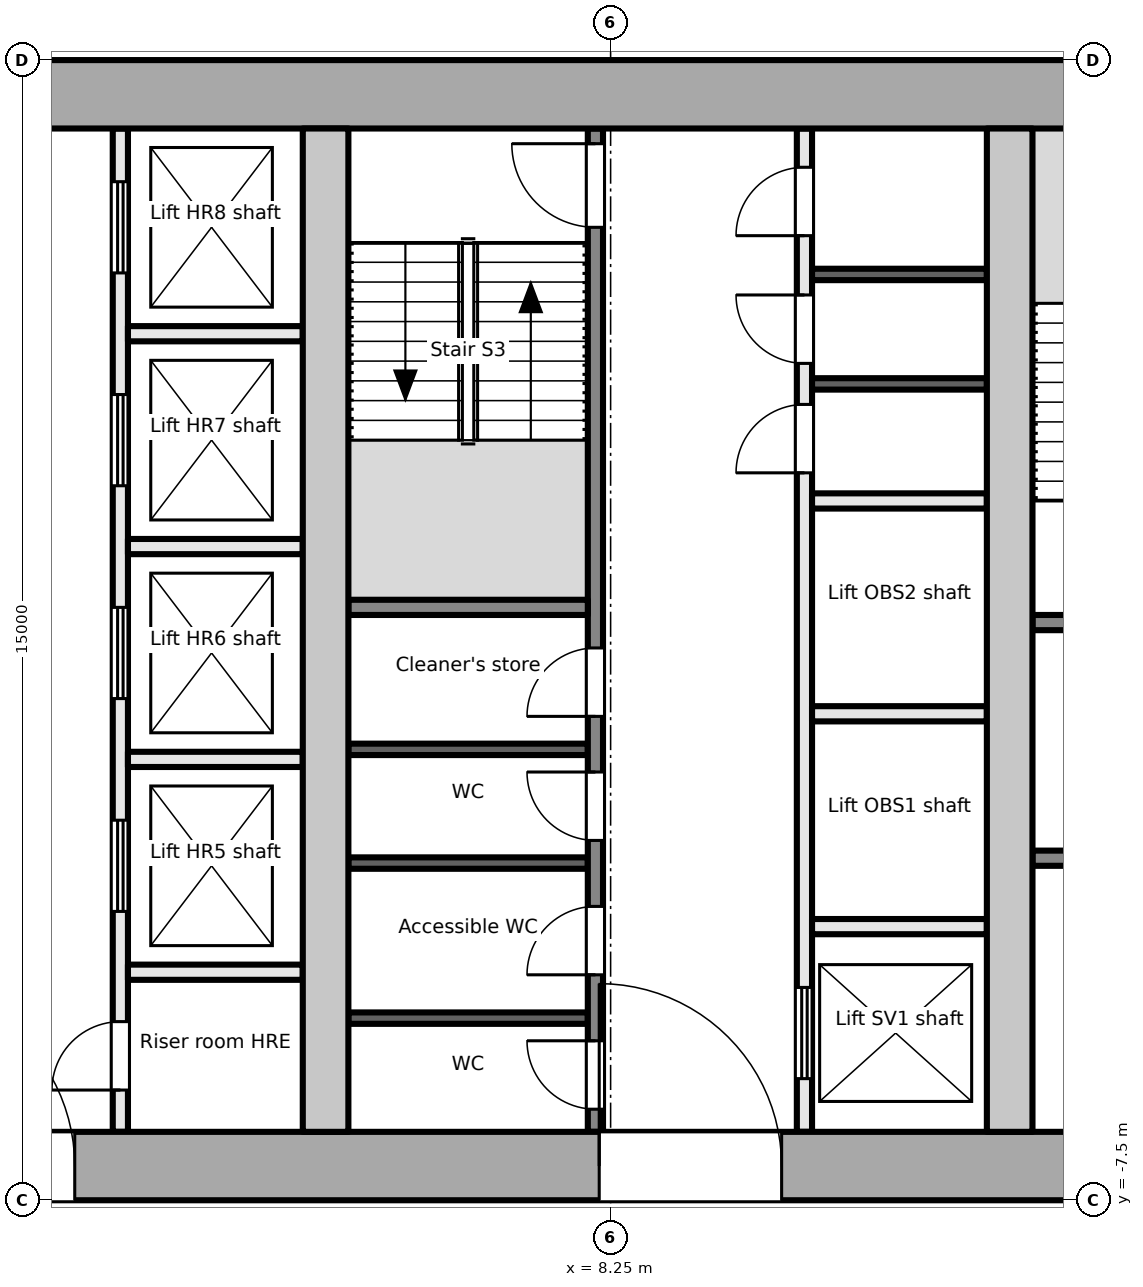
"""IFC4 building model, lengths in metres.
Left out: names, types, materials, properties, quantities, classifications, styles, units other than length and angle.
Written with IfcOpenShell. Run it as: python <this file> out.ifc"""

import sys

from ifc_helpers import new_model, si_unit, direction, frame, frame_2d, origin, place, context, subcontext, project, spatial, rectangle, extrude, element, fill, save


model = new_model("IFC4")
c1 = context("Model", 3, precision=1e-05, world=origin(), true_north=direction((0.0, 1.0)))
c2 = subcontext(c1, "Body", "Model", "MODEL_VIEW")
j1 = project(units=[si_unit("LENGTHUNIT", "METRE"), si_unit("PLANEANGLEUNIT", "RADIAN")], contexts=[c1])
p1 = place(None, origin())
s1 = spatial("IfcSite", under=j1, at=p1, CompositionType="ELEMENT")
p2 = place(p1, origin())
s2 = spatial("IfcBuilding", under=s1, at=p2, CompositionType="ELEMENT")
p3 = place(p2, frame((0.0, 0.0, 236.9)))
s3 = spatial("IfcBuildingStorey", under=s2, at=p3, CompositionType="ELEMENT", Elevation=236.9)
p4 = place(p3, frame((-18.0, -7.05, -0.2), z_axis=(0.0, 0.0, 1.0), x_axis=(1.0, 0.0, 0.0)))
e1 = element("IfcWall", 1, at=p4, inside=s3, PredefinedType="SHEAR", context=c2, shape_type="SweptSolid", body=[
    extrude(rectangle(XDim=36.0, YDim=0.9, at=frame_2d((18.0, 0.0))), origin(), (0.0, 0.0, 1.0), 3.9),
])
p5 = place(p4, frame((11.3, 0.0, 0.2)))
e2 = element("IfcOpeningElement", 2, at=p5, cuts=e1, PredefinedType="OPENING", context=c2, shape_type="SweptSolid", body=[
    extrude(rectangle(XDim=1.8, YDim=2.1, at=frame_2d((0.9, 1.05))), frame((0.0, 0.46, 0.0), z_axis=(0.0, -1.0, 0.0), x_axis=(1.0, 0.0, 0.0)), (0.0, 0.0, 1.0), 0.921),
])
p6 = place(p4, frame((16.8, 0.0, 0.2)))
e3 = element("IfcOpeningElement", 3, at=p6, cuts=e1, PredefinedType="OPENING", context=c2, shape_type="SweptSolid", body=[
    extrude(rectangle(XDim=2.4, YDim=2.1, at=frame_2d((1.2, 1.05))), frame((0.0, 0.46, 0.0), z_axis=(0.0, -1.0, 0.0), x_axis=(1.0, 0.0, 0.0)), (0.0, 0.0, 1.0), 0.921),
])
p7 = place(p4, frame((26.1, 0.0, 0.2)))
e4 = element("IfcOpeningElement", 4, at=p7, cuts=e1, PredefinedType="OPENING", context=c2, shape_type="SweptSolid", body=[
    extrude(rectangle(XDim=2.4, YDim=2.1, at=frame_2d((1.2, 1.05))), frame((0.0, 0.46, 0.0), z_axis=(0.0, -1.0, 0.0), x_axis=(1.0, 0.0, 0.0)), (0.0, 0.0, 1.0), 0.921),
])
p8 = place(p3, frame((-18.0, 7.05, -0.2), z_axis=(0.0, 0.0, 1.0), x_axis=(1.0, 0.0, 0.0)))
e5 = element("IfcWall", 5, at=p8, inside=s3, PredefinedType="SHEAR", context=c2, shape_type="SweptSolid", body=[
    extrude(rectangle(XDim=36.0, YDim=0.9, at=frame_2d((18.0, 0.0))), origin(), (0.0, 0.0, 1.0), 3.9),
])
for number, where, z_axis, x_axis in (
    (6, (4.5, -6.6, -0.2), (0.0, 0.0, 1.0), (0.0, 1.0, 0.0)),
    (7, (13.5, -6.6, -0.2), (0.0, 0.0, 1.0), (0.0, 1.0, 0.0)),
):
    element("IfcWall", number, at=place(p3, frame(where, z_axis=z_axis, x_axis=x_axis)), inside=s3, PredefinedType="SHEAR", context=c2, shape_type="SweptSolid", body=[
        extrude(rectangle(XDim=13.2, YDim=0.6, at=frame_2d((6.6, 0.0))), origin(), (0.0, 0.0, 1.0), 3.9),
    ])
p9 = place(p3, frame((13.8, -3.0, 0.0), z_axis=(0.0, 0.0, 1.0), x_axis=(1.0, 0.0, 0.0)))
e8 = element("IfcWall", 8, at=p9, inside=s3, PredefinedType="PARTITIONING", context=c2, shape_type="SweptSolid", body=[
    extrude(rectangle(XDim=3.3, YDim=0.2, at=frame_2d((1.65, 0.0))), origin(), (0.0, 0.0, 1.0), 3.7),
])
p10 = place(p9, frame((1.1, 0.0, 0.0)))
e9 = element("IfcOpeningElement", 9, at=p10, cuts=e8, PredefinedType="OPENING", context=c2, shape_type="SweptSolid", body=[
    extrude(rectangle(XDim=1.1, YDim=2.1, at=frame_2d((0.55, 1.05))), frame((0.0, 0.111, 0.0), z_axis=(0.0, -1.0, 0.0), x_axis=(1.0, 0.0, 0.0)), (0.0, 0.0, 1.0), 0.221),
])
p11 = place(p3, frame((13.8, 0.1, 0.0), z_axis=(0.0, 0.0, 1.0), x_axis=(1.0, 0.0, 0.0)))
e10 = element("IfcWall", 10, at=p11, inside=s3, PredefinedType="PARTITIONING", context=c2, shape_type="SweptSolid", body=[
    extrude(rectangle(XDim=3.3, YDim=0.2, at=frame_2d((1.65, 0.0))), origin(), (0.0, 0.0, 1.0), 3.7),
])
p12 = place(p11, frame((1.1, 0.0, 0.0)))
e11 = element("IfcOpeningElement", 11, at=p12, cuts=e10, PredefinedType="OPENING", context=c2, shape_type="SweptSolid", body=[
    extrude(rectangle(XDim=1.1, YDim=2.1, at=frame_2d((0.55, 1.05))), frame((0.0, 0.111, 0.0), z_axis=(0.0, -1.0, 0.0), x_axis=(1.0, 0.0, 0.0)), (0.0, 0.0, 1.0), 0.221),
])
p13 = place(p3, frame((1.8, -6.6, 0.0), z_axis=(0.0, 0.0, 1.0), x_axis=(0.0, 1.0, 0.0)))
e12 = element("IfcWall", 12, at=p13, inside=s3, PredefinedType="PARTITIONING", context=c2, shape_type="SweptSolid", body=[
    extrude(rectangle(XDim=13.2, YDim=0.2, at=frame_2d((6.6, 0.0))), origin(), (0.0, 0.0, 1.0), 3.7),
])
p14 = place(p13, frame((0.55, 0.0, 0.0)))
e13 = element("IfcOpeningElement", 13, at=p14, cuts=e12, PredefinedType="OPENING", context=c2, shape_type="SweptSolid", body=[
    extrude(rectangle(XDim=0.9, YDim=2.1, at=frame_2d((0.45, 1.05))), frame((0.0, 0.111, 0.0), z_axis=(0.0, -1.0, 0.0), x_axis=(1.0, 0.0, 0.0)), (0.0, 0.0, 1.0), 0.221),
])
p15 = place(p13, frame((2.9, 0.0, 0.0)))
e14 = element("IfcOpeningElement", 14, at=p15, cuts=e12, PredefinedType="OPENING", context=c2, shape_type="SweptSolid", body=[
    extrude(rectangle(XDim=1.2, YDim=2.1, at=frame_2d((0.6, 1.05))), frame((0.0, 0.111, 0.0), z_axis=(0.0, -1.0, 0.0), x_axis=(1.0, 0.0, 0.0)), (0.0, 0.0, 1.0), 0.221),
])
p16 = place(p13, frame((5.7, 0.0, 0.0)))
e15 = element("IfcOpeningElement", 15, at=p16, cuts=e12, PredefinedType="OPENING", context=c2, shape_type="SweptSolid", body=[
    extrude(rectangle(XDim=1.2, YDim=2.1, at=frame_2d((0.6, 1.05))), frame((0.0, 0.111, 0.0), z_axis=(0.0, -1.0, 0.0), x_axis=(1.0, 0.0, 0.0)), (0.0, 0.0, 1.0), 0.221),
])
p17 = place(p13, frame((8.5, 0.0, 0.0)))
e16 = element("IfcOpeningElement", 16, at=p17, cuts=e12, PredefinedType="OPENING", context=c2, shape_type="SweptSolid", body=[
    extrude(rectangle(XDim=1.2, YDim=2.1, at=frame_2d((0.6, 1.05))), frame((0.0, 0.111, 0.0), z_axis=(0.0, -1.0, 0.0), x_axis=(1.0, 0.0, 0.0)), (0.0, 0.0, 1.0), 0.221),
])
p18 = place(p13, frame((11.3, 0.0, 0.0)))
e17 = element("IfcOpeningElement", 17, at=p18, cuts=e12, PredefinedType="OPENING", context=c2, shape_type="SweptSolid", body=[
    extrude(rectangle(XDim=1.2, YDim=2.1, at=frame_2d((0.6, 1.05))), frame((0.0, 0.111, 0.0), z_axis=(0.0, -1.0, 0.0), x_axis=(1.0, 0.0, 0.0)), (0.0, 0.0, 1.0), 0.221),
])
for number, where, z_axis, x_axis in (
    (18, (1.9, -1.7, 0.0), (0.0, 0.0, 1.0), (1.0, 0.0, 0.0)),
    (19, (1.9, 1.1, 0.0), (0.0, 0.0, 1.0), (1.0, 0.0, 0.0)),
    (20, (1.9, 3.9, 0.0), (0.0, 0.0, 1.0), (1.0, 0.0, 0.0)),
    (21, (1.9, -4.5, 0.0), (0.0, 0.0, 1.0), (1.0, 0.0, 0.0)),
):
    element("IfcWall", number, at=place(p3, frame(where, z_axis=z_axis, x_axis=x_axis)), inside=s3, PredefinedType="PARTITIONING", context=c2, shape_type="SweptSolid", body=[
        extrude(rectangle(XDim=2.3, YDim=0.2, at=frame_2d((1.15, 0.0))), origin(), (0.0, 0.0, 1.0), 3.7),
    ])
p19 = place(p3, frame((8.05, -6.6, 0.0), z_axis=(0.0, 0.0, 1.0), x_axis=(0.0, 1.0, 0.0)))
e22 = element("IfcWall", 22, at=p19, inside=s3, PredefinedType="PARTITIONING", context=c2, shape_type="SweptSolid", body=[
    extrude(rectangle(XDim=13.2, YDim=0.2, at=frame_2d((6.6, 0.0))), origin(), (0.0, 0.0, 1.0), 3.7),
])
p20 = place(p19, frame((0.298, 0.0, 0.0)))
e23 = element("IfcOpeningElement", 23, at=p20, cuts=e22, PredefinedType="OPENING", context=c2, shape_type="SweptSolid", body=[
    extrude(rectangle(XDim=0.9, YDim=2.1, at=frame_2d((0.45, 1.05))), frame((0.0, 0.111, 0.0), z_axis=(0.0, -1.0, 0.0), x_axis=(1.0, 0.0, 0.0)), (0.0, 0.0, 1.0), 0.221),
])
p21 = place(p19, frame((2.066, 0.0, 0.0)))
e24 = element("IfcOpeningElement", 24, at=p21, cuts=e22, PredefinedType="OPENING", context=c2, shape_type="SweptSolid", body=[
    extrude(rectangle(XDim=0.9, YDim=2.1, at=frame_2d((0.45, 1.05))), frame((0.0, 0.111, 0.0), z_axis=(0.0, -1.0, 0.0), x_axis=(1.0, 0.0, 0.0)), (0.0, 0.0, 1.0), 0.221),
])
p22 = place(p19, frame((3.834, 0.0, 0.0)))
e25 = element("IfcOpeningElement", 25, at=p22, cuts=e22, PredefinedType="OPENING", context=c2, shape_type="SweptSolid", body=[
    extrude(rectangle(XDim=0.9, YDim=2.1, at=frame_2d((0.45, 1.05))), frame((0.0, 0.111, 0.0), z_axis=(0.0, -1.0, 0.0), x_axis=(1.0, 0.0, 0.0)), (0.0, 0.0, 1.0), 0.221),
])
p23 = place(p19, frame((5.466, 0.0, 0.0)))
e26 = element("IfcOpeningElement", 26, at=p23, cuts=e22, PredefinedType="OPENING", context=c2, shape_type="SweptSolid", body=[
    extrude(rectangle(XDim=0.9, YDim=2.1, at=frame_2d((0.45, 1.05))), frame((0.0, 0.111, 0.0), z_axis=(0.0, -1.0, 0.0), x_axis=(1.0, 0.0, 0.0)), (0.0, 0.0, 1.0), 0.221),
])
p24 = place(p19, frame((11.9, 0.0, 0.0)))
e27 = element("IfcOpeningElement", 27, at=p24, cuts=e22, PredefinedType="OPENING", context=c2, shape_type="SweptSolid", body=[
    extrude(rectangle(XDim=1.1, YDim=2.1, at=frame_2d((0.55, 1.05))), frame((0.0, 0.111, 0.0), z_axis=(0.0, -1.0, 0.0), x_axis=(1.0, 0.0, 0.0)), (0.0, 0.0, 1.0), 0.221),
])
p25 = place(p3, frame((10.8, -6.6, 0.0), z_axis=(0.0, 0.0, 1.0), x_axis=(0.0, 1.0, 0.0)))
e28 = element("IfcWall", 28, at=p25, inside=s3, PredefinedType="PARTITIONING", context=c2, shape_type="SweptSolid", body=[
    extrude(rectangle(XDim=13.2, YDim=0.2, at=frame_2d((6.6, 0.0))), origin(), (0.0, 0.0, 1.0), 3.7),
])
p26 = place(p25, frame((0.7, 0.0, 0.0)))
e29 = element("IfcOpeningElement", 29, at=p26, cuts=e28, PredefinedType="OPENING", context=c2, shape_type="SweptSolid", body=[
    extrude(rectangle(XDim=1.2, YDim=2.1, at=frame_2d((0.6, 1.05))), frame((0.0, 0.111, 0.0), z_axis=(0.0, -1.0, 0.0), x_axis=(1.0, 0.0, 0.0)), (0.0, 0.0, 1.0), 0.221),
])
p27 = place(p25, frame((8.67, 0.0, 0.0)))
e30 = element("IfcOpeningElement", 30, at=p27, cuts=e28, PredefinedType="OPENING", context=c2, shape_type="SweptSolid", body=[
    extrude(rectangle(XDim=0.9, YDim=2.1, at=frame_2d((0.45, 1.05))), frame((0.0, 0.111, 0.0), z_axis=(0.0, -1.0, 0.0), x_axis=(1.0, 0.0, 0.0)), (0.0, 0.0, 1.0), 0.221),
])
p28 = place(p25, frame((10.11, 0.0, 0.0)))
e31 = element("IfcOpeningElement", 31, at=p28, cuts=e28, PredefinedType="OPENING", context=c2, shape_type="SweptSolid", body=[
    extrude(rectangle(XDim=0.9, YDim=2.1, at=frame_2d((0.45, 1.05))), frame((0.0, 0.111, 0.0), z_axis=(0.0, -1.0, 0.0), x_axis=(1.0, 0.0, 0.0)), (0.0, 0.0, 1.0), 0.221),
])
p29 = place(p25, frame((11.79, 0.0, 0.0)))
e32 = element("IfcOpeningElement", 32, at=p29, cuts=e28, PredefinedType="OPENING", context=c2, shape_type="SweptSolid", body=[
    extrude(rectangle(XDim=0.9, YDim=2.1, at=frame_2d((0.45, 1.05))), frame((0.0, 0.111, 0.0), z_axis=(0.0, -1.0, 0.0), x_axis=(1.0, 0.0, 0.0)), (0.0, 0.0, 1.0), 0.221),
])
p30 = place(p3, frame((4.8, 0.3, 0.0), z_axis=(0.0, 0.0, 1.0), x_axis=(1.0, 0.0, 0.0)))
e33 = element("IfcWall", 33, at=p30, inside=s3, PredefinedType="PARTITIONING", context=c2, shape_type="SweptSolid", body=[
    extrude(rectangle(XDim=3.15, YDim=0.2, at=frame_2d((1.575, 0.0))), origin(), (0.0, 0.0, 1.0), 3.7),
])
for number, where, z_axis, x_axis in (
    (34, (4.8, -5.104, 0.0), (0.0, 0.0, 1.0), (1.0, 0.0, 0.0)),
    (35, (4.8, -3.064, 0.0), (0.0, 0.0, 1.0), (1.0, 0.0, 0.0)),
    (36, (4.8, -1.568, 0.0), (0.0, 0.0, 1.0), (1.0, 0.0, 0.0)),
):
    element("IfcWall", number, at=place(p3, frame(where, z_axis=z_axis, x_axis=x_axis)), inside=s3, PredefinedType="PARTITIONING", context=c2, shape_type="SweptSolid", body=[
        extrude(rectangle(XDim=3.15, YDim=0.15, at=frame_2d((1.575, 0.0))), origin(), (0.0, 0.0, 1.0), 3.7),
    ])
for number, where, z_axis, x_axis in (
    (37, (10.9, -3.9, 0.0), (0.0, 0.0, 1.0), (1.0, 0.0, 0.0)),
    (38, (10.9, -1.1, 0.0), (0.0, 0.0, 1.0), (1.0, 0.0, 0.0)),
    (39, (10.9, 1.7, 0.0), (0.0, 0.0, 1.0), (1.0, 0.0, 0.0)),
):
    element("IfcWall", number, at=place(p3, frame(where, z_axis=z_axis, x_axis=x_axis)), inside=s3, PredefinedType="PARTITIONING", context=c2, shape_type="SweptSolid", body=[
        extrude(rectangle(XDim=2.3, YDim=0.2, at=frame_2d((1.15, 0.0))), origin(), (0.0, 0.0, 1.0), 3.7),
    ])
for number, where, z_axis, x_axis in (
    (40, (10.9, 3.24, 0.0), (0.0, 0.0, 1.0), (1.0, 0.0, 0.0)),
    (41, (10.9, 4.68, 0.0), (0.0, 0.0, 1.0), (1.0, 0.0, 0.0)),
):
    element("IfcWall", number, at=place(p3, frame(where, z_axis=z_axis, x_axis=x_axis)), inside=s3, PredefinedType="PARTITIONING", context=c2, shape_type="SweptSolid", body=[
        extrude(rectangle(XDim=2.3, YDim=0.15, at=frame_2d((1.15, 0.0))), origin(), (0.0, 0.0, 1.0), 3.7),
    ])
p31 = place(p14, origin())
e42 = element("IfcDoor", 42, at=p31, inside=s3, OperationType="SINGLE_SWING_LEFT", PredefinedType="DOOR", context=c2, shape_type="SweptSolid", body=[
    extrude(rectangle(XDim=0.9, YDim=2.1, at=frame_2d((0.45, 1.05))), frame((0.0, 0.025, 0.0), z_axis=(0.0, -1.0, 0.0), x_axis=(1.0, 0.0, 0.0)), (0.0, 0.0, 1.0), 0.05),
])
fill(e13, e42)
p32 = place(p15, origin())
e43 = element("IfcDoor", 43, at=p32, inside=s3, OperationType="DOUBLE_DOOR_SLIDING", PredefinedType="DOOR", context=c2, shape_type="SweptSolid", body=[
    extrude(rectangle(XDim=1.2, YDim=2.1, at=frame_2d((0.6, 1.05))), frame((0.0, 0.025, 0.0), z_axis=(0.0, -1.0, 0.0), x_axis=(1.0, 0.0, 0.0)), (0.0, 0.0, 1.0), 0.05),
])
fill(e14, e43)
p33 = place(p16, origin())
e44 = element("IfcDoor", 44, at=p33, inside=s3, OperationType="DOUBLE_DOOR_SLIDING", PredefinedType="DOOR", context=c2, shape_type="SweptSolid", body=[
    extrude(rectangle(XDim=1.2, YDim=2.1, at=frame_2d((0.6, 1.05))), frame((0.0, 0.025, 0.0), z_axis=(0.0, -1.0, 0.0), x_axis=(1.0, 0.0, 0.0)), (0.0, 0.0, 1.0), 0.05),
])
fill(e15, e44)
p34 = place(p17, origin())
e45 = element("IfcDoor", 45, at=p34, inside=s3, OperationType="DOUBLE_DOOR_SLIDING", PredefinedType="DOOR", context=c2, shape_type="SweptSolid", body=[
    extrude(rectangle(XDim=1.2, YDim=2.1, at=frame_2d((0.6, 1.05))), frame((0.0, 0.025, 0.0), z_axis=(0.0, -1.0, 0.0), x_axis=(1.0, 0.0, 0.0)), (0.0, 0.0, 1.0), 0.05),
])
fill(e16, e45)
p35 = place(p18, origin())
e46 = element("IfcDoor", 46, at=p35, inside=s3, OperationType="DOUBLE_DOOR_SLIDING", PredefinedType="DOOR", context=c2, shape_type="SweptSolid", body=[
    extrude(rectangle(XDim=1.2, YDim=2.1, at=frame_2d((0.6, 1.05))), frame((0.0, 0.025, 0.0), z_axis=(0.0, -1.0, 0.0), x_axis=(1.0, 0.0, 0.0)), (0.0, 0.0, 1.0), 0.05),
])
fill(e17, e46)
p36 = place(p6, origin())
e47 = element("IfcDoor", 47, at=p36, inside=s3, OperationType="DOUBLE_DOOR_DOUBLE_SWING", PredefinedType="DOOR", context=c2, shape_type="SweptSolid", body=[
    extrude(rectangle(XDim=2.4, YDim=2.1, at=frame_2d((1.2, 1.05))), frame((0.0, 0.025, 0.0), z_axis=(0.0, -1.0, 0.0), x_axis=(1.0, 0.0, 0.0)), (0.0, 0.0, 1.0), 0.05),
])
fill(e3, e47)
p37 = place(p20, origin())
e48 = element("IfcDoor", 48, at=p37, inside=s3, OperationType="SINGLE_SWING_RIGHT", PredefinedType="DOOR", context=c2, shape_type="SweptSolid", body=[
    extrude(rectangle(XDim=0.9, YDim=2.1, at=frame_2d((0.45, 1.05))), frame((0.0, 0.025, 0.0), z_axis=(0.0, -1.0, 0.0), x_axis=(1.0, 0.0, 0.0)), (0.0, 0.0, 1.0), 0.05),
])
fill(e23, e48)
p38 = place(p21, origin())
e49 = element("IfcDoor", 49, at=p38, inside=s3, OperationType="SINGLE_SWING_LEFT", PredefinedType="DOOR", context=c2, shape_type="SweptSolid", body=[
    extrude(rectangle(XDim=0.9, YDim=2.1, at=frame_2d((0.45, 1.05))), frame((0.0, 0.025, 0.0), z_axis=(0.0, -1.0, 0.0), x_axis=(1.0, 0.0, 0.0)), (0.0, 0.0, 1.0), 0.05),
])
fill(e24, e49)
p39 = place(p22, origin())
e50 = element("IfcDoor", 50, at=p39, inside=s3, OperationType="SINGLE_SWING_RIGHT", PredefinedType="DOOR", context=c2, shape_type="SweptSolid", body=[
    extrude(rectangle(XDim=0.9, YDim=2.1, at=frame_2d((0.45, 1.05))), frame((0.0, 0.025, 0.0), z_axis=(0.0, -1.0, 0.0), x_axis=(1.0, 0.0, 0.0)), (0.0, 0.0, 1.0), 0.05),
])
fill(e25, e50)
p40 = place(p23, origin())
e51 = element("IfcDoor", 51, at=p40, inside=s3, OperationType="SINGLE_SWING_LEFT", PredefinedType="DOOR", context=c2, shape_type="SweptSolid", body=[
    extrude(rectangle(XDim=0.9, YDim=2.1, at=frame_2d((0.45, 1.05))), frame((0.0, 0.025, 0.0), z_axis=(0.0, -1.0, 0.0), x_axis=(1.0, 0.0, 0.0)), (0.0, 0.0, 1.0), 0.05),
])
fill(e26, e51)
p41 = place(p24, origin())
e52 = element("IfcDoor", 52, at=p41, inside=s3, OperationType="SINGLE_SWING_RIGHT", PredefinedType="DOOR", context=c2, shape_type="SweptSolid", body=[
    extrude(rectangle(XDim=1.1, YDim=2.1, at=frame_2d((0.55, 1.05))), frame((0.0, 0.025, 0.0), z_axis=(0.0, -1.0, 0.0), x_axis=(1.0, 0.0, 0.0)), (0.0, 0.0, 1.0), 0.05),
])
fill(e27, e52)
p42 = place(p7, origin())
e53 = element("IfcDoor", 53, at=p42, inside=s3, OperationType="DOUBLE_DOOR_DOUBLE_SWING", PredefinedType="DOOR", context=c2, shape_type="SweptSolid", body=[
    extrude(rectangle(XDim=2.4, YDim=2.1, at=frame_2d((1.2, 1.05))), frame((0.0, 0.025, 0.0), z_axis=(0.0, -1.0, 0.0), x_axis=(1.0, 0.0, 0.0)), (0.0, 0.0, 1.0), 0.05),
])
fill(e4, e53)
p43 = place(p26, origin())
e54 = element("IfcDoor", 54, at=p43, inside=s3, OperationType="DOUBLE_DOOR_SLIDING", PredefinedType="DOOR", context=c2, shape_type="SweptSolid", body=[
    extrude(rectangle(XDim=1.2, YDim=2.1, at=frame_2d((0.6, 1.05))), frame((0.0, 0.025, 0.0), z_axis=(0.0, -1.0, 0.0), x_axis=(1.0, 0.0, 0.0)), (0.0, 0.0, 1.0), 0.05),
])
fill(e29, e54)
p44 = place(p27, origin())
e55 = element("IfcDoor", 55, at=p44, inside=s3, OperationType="SINGLE_SWING_LEFT", PredefinedType="DOOR", context=c2, shape_type="SweptSolid", body=[
    extrude(rectangle(XDim=0.9, YDim=2.1, at=frame_2d((0.45, 1.05))), frame((0.0, 0.025, 0.0), z_axis=(0.0, -1.0, 0.0), x_axis=(1.0, 0.0, 0.0)), (0.0, 0.0, 1.0), 0.05),
])
fill(e30, e55)
p45 = place(p28, origin())
e56 = element("IfcDoor", 56, at=p45, inside=s3, OperationType="SINGLE_SWING_RIGHT", PredefinedType="DOOR", context=c2, shape_type="SweptSolid", body=[
    extrude(rectangle(XDim=0.9, YDim=2.1, at=frame_2d((0.45, 1.05))), frame((0.0, 0.025, 0.0), z_axis=(0.0, -1.0, 0.0), x_axis=(1.0, 0.0, 0.0)), (0.0, 0.0, 1.0), 0.05),
])
fill(e31, e56)
p46 = place(p29, origin())
e57 = element("IfcDoor", 57, at=p46, inside=s3, OperationType="SINGLE_SWING_LEFT", PredefinedType="DOOR", context=c2, shape_type="SweptSolid", body=[
    extrude(rectangle(XDim=0.9, YDim=2.1, at=frame_2d((0.45, 1.05))), frame((0.0, 0.025, 0.0), z_axis=(0.0, -1.0, 0.0), x_axis=(1.0, 0.0, 0.0)), (0.0, 0.0, 1.0), 0.05),
])
fill(e32, e57)
save(model, sys.argv[1])
